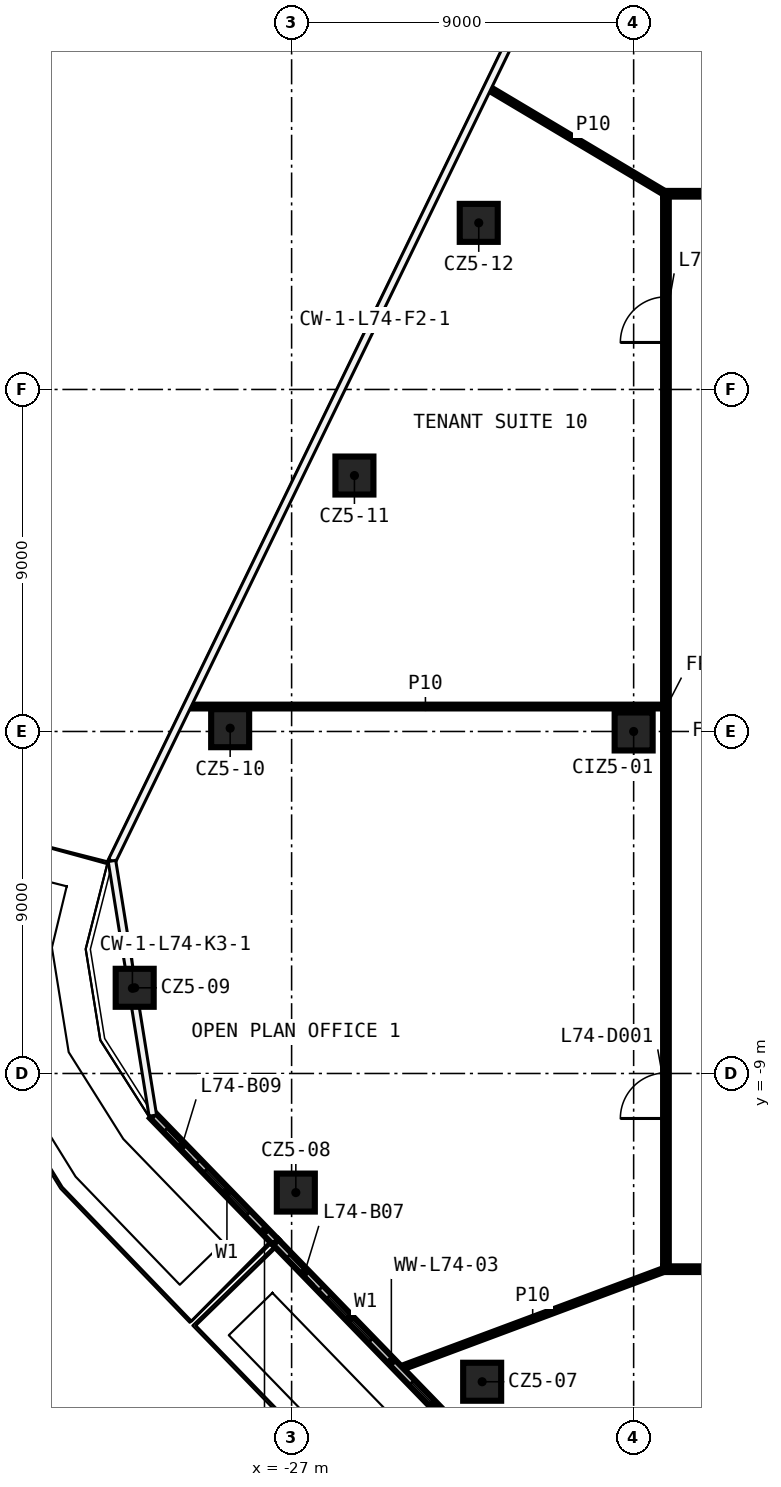
"""IFC4 building model, lengths in metres.
Left out: names, types, materials, properties, quantities, classifications, styles, units other than length and angle.
Written with IfcOpenShell. Run it as: python <this file> out.ifc"""

import sys

from ifc_helpers import new_model, si_unit, direction, frame, frame_2d, origin, origin_2d, place, context, subcontext, project, spatial, rectangle, extrude, element, fill, save


model = new_model("IFC4")
c1 = context("Model", 3, precision=1e-05, world=origin(), true_north=direction((0.0, 1.0)))
c2 = subcontext(c1, "Body", "Model", "MODEL_VIEW")
j1 = project(units=[si_unit("LENGTHUNIT", "METRE"), si_unit("PLANEANGLEUNIT", "RADIAN")], contexts=[c1])
p1 = place(None, origin())
s1 = spatial("IfcSite", under=j1, at=p1, CompositionType="ELEMENT")
p2 = place(p1, origin())
s2 = spatial("IfcBuilding", under=s1, at=p2, CompositionType="ELEMENT")
p3 = place(p2, frame((0.0, 0.0, 344.6)))
s3 = spatial("IfcBuildingStorey", under=s2, at=p3, CompositionType="ELEMENT", Elevation=344.6)
for number, where, z_axis, x_axis in (
    (1, (-21.986, -17.112, 0.0), (0.0, 0.0, 1.0), (1.0, 0.0, 0.0)),
    (2, (-26.889, -12.134, 0.0), (0.0, 0.0, 1.0), (1.0, 0.0, 0.0)),
    (3, (-31.129, -6.745, 0.0), (0.0, 0.0, 1.0), (1.0, 0.0, 0.0)),
    (4, (-28.617, 0.086, 0.0), (0.0, 0.0, 1.0), (1.0, 0.0, 0.0)),
    (5, (-25.347, 6.735, 0.0), (0.0, 0.0, 1.0), (1.0, 0.0, 0.0)),
    (6, (-22.076, 13.384, 0.0), (0.0, 0.0, 1.0), (1.0, 0.0, 0.0)),
    (7, (-18.0, 0.0, 0.0), (0.0, 0.0, 1.0), (1.0, 0.0, 0.0)),
):
    element("IfcColumn", number, at=place(p3, frame(where, z_axis=z_axis, x_axis=x_axis)), inside=s3, PredefinedType="COLUMN", context=c2, shape_type="SweptSolid", body=[
        extrude(rectangle(XDim=1.0, YDim=1.0, at=origin_2d()), origin(), (0.0, 0.0, 1.0), 3.82),
    ])
p4 = place(p3, frame((17.225, -14.15, 0.0), z_axis=(0.0, 0.0, 1.0), x_axis=(-1.0, 0.0, 0.0)))
e8 = element("IfcWall", 8, at=p4, inside=s3, PredefinedType="PARTITIONING", context=c2, shape_type="SweptSolid", body=[
    extrude(rectangle(XDim=34.45, YDim=0.15, at=frame_2d((17.225, 0.0))), origin(), (0.0, 0.0, 1.0), 3.82),
])
p5 = place(p4, frame((31.464, 0.0, 0.0)))
e9 = element("IfcOpeningElement", 9, at=p5, cuts=e8, PredefinedType="OPENING", context=c2, shape_type="SweptSolid", body=[
    extrude(rectangle(XDim=1.2, YDim=2.1, at=frame_2d((0.6, 1.05))), frame((0.0, 0.085, 0.0), z_axis=(0.0, -1.0, 0.0), x_axis=(1.0, 0.0, 0.0)), (0.0, 0.0, 1.0), 0.17),
])
p6 = place(p4, frame((24.546, 0.0, 0.0)))
e10 = element("IfcOpeningElement", 10, at=p6, cuts=e8, PredefinedType="OPENING", context=c2, shape_type="SweptSolid", body=[
    extrude(rectangle(XDim=1.2, YDim=2.1, at=frame_2d((0.6, 1.05))), frame((0.0, 0.085, 0.0), z_axis=(0.0, -1.0, 0.0), x_axis=(1.0, 0.0, 0.0)), (0.0, 0.0, 1.0), 0.17),
])
p7 = place(p4, frame((19.962, 0.0, 0.0)))
e11 = element("IfcOpeningElement", 11, at=p7, cuts=e8, PredefinedType="OPENING", context=c2, shape_type="SweptSolid", body=[
    extrude(rectangle(XDim=1.2, YDim=2.1, at=frame_2d((0.6, 1.05))), frame((0.0, 0.085, 0.0), z_axis=(0.0, -1.0, 0.0), x_axis=(1.0, 0.0, 0.0)), (0.0, 0.0, 1.0), 0.17),
])
p8 = place(p4, frame((15.375, 0.0, 0.0)))
e12 = element("IfcOpeningElement", 12, at=p8, cuts=e8, PredefinedType="OPENING", context=c2, shape_type="SweptSolid", body=[
    extrude(rectangle(XDim=1.2, YDim=2.1, at=frame_2d((0.6, 1.05))), frame((0.0, 0.085, 0.0), z_axis=(0.0, -1.0, 0.0), x_axis=(1.0, 0.0, 0.0)), (0.0, 0.0, 1.0), 0.17),
])
p9 = place(p4, frame((10.788, 0.0, 0.0)))
e13 = element("IfcOpeningElement", 13, at=p9, cuts=e8, PredefinedType="OPENING", context=c2, shape_type="SweptSolid", body=[
    extrude(rectangle(XDim=1.2, YDim=2.1, at=frame_2d((0.6, 1.05))), frame((0.0, 0.085, 0.0), z_axis=(0.0, -1.0, 0.0), x_axis=(1.0, 0.0, 0.0)), (0.0, 0.0, 1.0), 0.17),
])
p10 = place(p4, frame((6.202, 0.0, 0.0)))
e14 = element("IfcOpeningElement", 14, at=p10, cuts=e8, PredefinedType="OPENING", context=c2, shape_type="SweptSolid", body=[
    extrude(rectangle(XDim=1.2, YDim=2.1, at=frame_2d((0.6, 1.05))), frame((0.0, 0.085, 0.0), z_axis=(0.0, -1.0, 0.0), x_axis=(1.0, 0.0, 0.0)), (0.0, 0.0, 1.0), 0.17),
])
p11 = place(p4, frame((1.897, 0.0, 0.0)))
e15 = element("IfcOpeningElement", 15, at=p11, cuts=e8, PredefinedType="OPENING", context=c2, shape_type="SweptSolid", body=[
    extrude(rectangle(XDim=1.2, YDim=2.1, at=frame_2d((0.6, 1.05))), frame((0.0, 0.085, 0.0), z_axis=(0.0, -1.0, 0.0), x_axis=(1.0, 0.0, 0.0)), (0.0, 0.0, 1.0), 0.17),
])
p12 = place(p3, frame((-29.732, 0.656, 0.0), z_axis=(0.0, 0.0, 1.0), x_axis=(1.0, 0.0, 0.0)))
e16 = element("IfcWall", 16, at=p12, inside=s3, PredefinedType="PARTITIONING", context=c2, shape_type="SweptSolid", body=[
    extrude(rectangle(XDim=12.507, YDim=0.1, at=frame_2d((6.253, 0.0))), origin(), (0.0, 0.0, 1.0), 3.82),
])
p13 = place(p3, frame((-17.225, 14.15, 0.0), z_axis=(0.0, 0.0, 1.0), x_axis=(1.0, 0.0, 0.0)))
e17 = element("IfcWall", 17, at=p13, inside=s3, PredefinedType="PARTITIONING", context=c2, shape_type="SweptSolid", body=[
    extrude(rectangle(XDim=34.45, YDim=0.15, at=frame_2d((17.225, 0.0))), origin(), (0.0, 0.0, 1.0), 3.82),
])
p14 = place(p13, frame((31.19, 0.0, 0.0)))
e18 = element("IfcOpeningElement", 18, at=p14, cuts=e17, PredefinedType="OPENING", context=c2, shape_type="SweptSolid", body=[
    extrude(rectangle(XDim=1.2, YDim=2.1, at=frame_2d((0.6, 1.05))), frame((0.0, 0.085, 0.0), z_axis=(0.0, -1.0, 0.0), x_axis=(1.0, 0.0, 0.0)), (0.0, 0.0, 1.0), 0.17),
])
p15 = place(p13, frame((24.621, 0.0, 0.0)))
e19 = element("IfcOpeningElement", 19, at=p15, cuts=e17, PredefinedType="OPENING", context=c2, shape_type="SweptSolid", body=[
    extrude(rectangle(XDim=1.2, YDim=2.1, at=frame_2d((0.6, 1.05))), frame((0.0, 0.085, 0.0), z_axis=(0.0, -1.0, 0.0), x_axis=(1.0, 0.0, 0.0)), (0.0, 0.0, 1.0), 0.17),
])
p16 = place(p13, frame((17.703, 0.0, 0.0)))
e20 = element("IfcOpeningElement", 20, at=p16, cuts=e17, PredefinedType="OPENING", context=c2, shape_type="SweptSolid", body=[
    extrude(rectangle(XDim=1.2, YDim=2.1, at=frame_2d((0.6, 1.05))), frame((0.0, 0.085, 0.0), z_axis=(0.0, -1.0, 0.0), x_axis=(1.0, 0.0, 0.0)), (0.0, 0.0, 1.0), 0.17),
])
p17 = place(p13, frame((10.781, 0.0, 0.0)))
e21 = element("IfcOpeningElement", 21, at=p17, cuts=e17, PredefinedType="OPENING", context=c2, shape_type="SweptSolid", body=[
    extrude(rectangle(XDim=1.2, YDim=2.1, at=frame_2d((0.6, 1.05))), frame((0.0, 0.085, 0.0), z_axis=(0.0, -1.0, 0.0), x_axis=(1.0, 0.0, 0.0)), (0.0, 0.0, 1.0), 0.17),
])
p18 = place(p13, frame((6.171, 0.0, 0.0)))
e22 = element("IfcOpeningElement", 22, at=p18, cuts=e17, PredefinedType="OPENING", context=c2, shape_type="SweptSolid", body=[
    extrude(rectangle(XDim=1.2, YDim=2.1, at=frame_2d((0.6, 1.05))), frame((0.0, 0.085, 0.0), z_axis=(0.0, -1.0, 0.0), x_axis=(1.0, 0.0, 0.0)), (0.0, 0.0, 1.0), 0.17),
])
p19 = place(p13, frame((1.932, 0.0, 0.0)))
e23 = element("IfcOpeningElement", 23, at=p19, cuts=e17, PredefinedType="OPENING", context=c2, shape_type="SweptSolid", body=[
    extrude(rectangle(XDim=1.2, YDim=2.1, at=frame_2d((0.6, 1.05))), frame((0.0, 0.085, 0.0), z_axis=(0.0, -1.0, 0.0), x_axis=(1.0, 0.0, 0.0)), (0.0, 0.0, 1.0), 0.17),
])
p20 = place(p3, frame((-24.164, -16.767, 0.0), z_axis=(0.0, 0.0, 1.0), x_axis=(0.936910882714, 0.349568302127, 0.0)))
e24 = element("IfcWall", 24, at=p20, inside=s3, PredefinedType="PARTITIONING", context=c2, shape_type="SweptSolid", body=[
    extrude(rectangle(XDim=7.486, YDim=0.1, at=frame_2d((3.743, 0.0))), origin(), (0.0, 0.0, 1.0), 3.82),
])
p21 = place(p3, frame((-17.15, -14.075, 0.0), z_axis=(0.0, 0.0, 1.0), x_axis=(0.0, 1.0, 0.0)))
e25 = element("IfcWall", 25, at=p21, inside=s3, PredefinedType="PARTITIONING", context=c2, shape_type="SweptSolid", body=[
    extrude(rectangle(XDim=28.15, YDim=0.15, at=frame_2d((14.075, 0.0))), origin(), (0.0, 0.0, 1.0), 3.82),
])
p22 = place(p21, frame((3.891, 0.0, 0.0)))
e26 = element("IfcOpeningElement", 26, at=p22, cuts=e25, PredefinedType="OPENING", context=c2, shape_type="SweptSolid", body=[
    extrude(rectangle(XDim=1.2, YDim=2.1, at=frame_2d((0.6, 1.05))), frame((0.0, 0.085, 0.0), z_axis=(0.0, -1.0, 0.0), x_axis=(1.0, 0.0, 0.0)), (0.0, 0.0, 1.0), 0.17),
])
p23 = place(p21, frame((24.312, 0.0, 0.0)))
e27 = element("IfcOpeningElement", 27, at=p23, cuts=e25, PredefinedType="OPENING", context=c2, shape_type="SweptSolid", body=[
    extrude(rectangle(XDim=1.2, YDim=2.1, at=frame_2d((0.6, 1.05))), frame((0.0, 0.085, 0.0), z_axis=(0.0, -1.0, 0.0), x_axis=(1.0, 0.0, 0.0)), (0.0, 0.0, 1.0), 0.17),
])
p24 = place(p3, frame((-21.828, 16.935, 0.0), z_axis=(0.0, 0.0, 1.0), x_axis=(0.859229054867, -0.51159107818, 0.0)))
e28 = element("IfcWall", 28, at=p24, inside=s3, PredefinedType="PARTITIONING", context=c2, shape_type="SweptSolid", body=[
    extrude(rectangle(XDim=5.444, YDim=0.1, at=frame_2d((2.722, 0.0))), origin(), (0.0, 0.0, 1.0), 3.82),
])
p25 = place(p3, frame((-27.422, -13.438, 0.0), z_axis=(0.0, 0.0, 1.0), x_axis=(0.696377931732, -0.717675258175, 0.0)))
e29 = element("IfcWall", 29, at=p25, inside=s3, PredefinedType="SOLIDWALL", context=c2, shape_type="SweptSolid", body=[
    extrude(rectangle(XDim=9.297, YDim=0.2, at=frame_2d((4.648, 0.0))), origin(), (0.0, 0.0, 1.0), 3.7),
])
p26 = place(p25, frame((2.0, 0.0, 0.6)))
e30 = element("IfcOpeningElement", 30, at=p26, cuts=e29, PredefinedType="OPENING", context=c2, shape_type="SweptSolid", body=[
    extrude(rectangle(XDim=1.6, YDim=2.4, at=frame_2d((0.8, 1.2))), frame((0.0, 0.11, 0.0), z_axis=(0.0, -1.0, 0.0), x_axis=(1.0, 0.0, 0.0)), (0.0, 0.0, 1.0), 0.22),
])
p27 = place(p25, frame((0.5, 0.0, 0.0)))
e31 = element("IfcOpeningElement", 31, at=p27, cuts=e29, PredefinedType="OPENING", context=c2, shape_type="SweptSolid", body=[
    extrude(rectangle(XDim=1.2, YDim=2.4, at=frame_2d((0.6, 1.2))), frame((0.0, 0.11, 0.0), z_axis=(0.0, -1.0, 0.0), x_axis=(1.0, 0.0, 0.0)), (0.0, 0.0, 1.0), 0.22),
])
p28 = place(p25, frame((5.148, 0.0, 0.6)))
e32 = element("IfcOpeningElement", 32, at=p28, cuts=e29, PredefinedType="OPENING", context=c2, shape_type="SweptSolid", body=[
    extrude(rectangle(XDim=1.6, YDim=2.4, at=frame_2d((0.8, 1.2))), frame((0.0, 0.11, 0.0), z_axis=(0.0, -1.0, 0.0), x_axis=(1.0, 0.0, 0.0)), (0.0, 0.0, 1.0), 0.22),
])
p29 = place(p25, frame((7.249, 0.0, 0.0)))
e33 = element("IfcOpeningElement", 33, at=p29, cuts=e29, PredefinedType="OPENING", context=c2, shape_type="SweptSolid", body=[
    extrude(rectangle(XDim=1.2, YDim=2.4, at=frame_2d((0.6, 1.2))), frame((0.0, 0.11, 0.0), z_axis=(0.0, -1.0, 0.0), x_axis=(1.0, 0.0, 0.0)), (0.0, 0.0, 1.0), 0.22),
])
p30 = place(p3, frame((-30.652, -10.109, 0.0), z_axis=(0.0, 0.0, 1.0), x_axis=(0.696367753757, -0.717685133974, 0.0)))
e34 = element("IfcWall", 34, at=p30, inside=s3, PredefinedType="SOLIDWALL", context=c2, shape_type="SweptSolid", body=[
    extrude(rectangle(XDim=4.638, YDim=0.2, at=frame_2d((2.319, 0.0))), origin(), (0.0, 0.0, 1.0), 3.7),
])
p31 = place(p30, frame((2.0, 0.0, 0.6)))
e35 = element("IfcOpeningElement", 35, at=p31, cuts=e34, PredefinedType="OPENING", context=c2, shape_type="SweptSolid", body=[
    extrude(rectangle(XDim=1.6, YDim=2.4, at=frame_2d((0.8, 1.2))), frame((0.0, 0.11, 0.0), z_axis=(0.0, -1.0, 0.0), x_axis=(1.0, 0.0, 0.0)), (0.0, 0.0, 1.0), 0.22),
])
p32 = place(p30, frame((0.5, 0.0, 0.0)))
e36 = element("IfcOpeningElement", 36, at=p32, cuts=e34, PredefinedType="OPENING", context=c2, shape_type="SweptSolid", body=[
    extrude(rectangle(XDim=1.2, YDim=2.4, at=frame_2d((0.6, 1.2))), frame((0.0, 0.11, 0.0), z_axis=(0.0, -1.0, 0.0), x_axis=(1.0, 0.0, 0.0)), (0.0, 0.0, 1.0), 0.22),
])
p33 = place(p22, origin())
e37 = element("IfcDoor", 37, at=p33, inside=s3, OperationType="SINGLE_SWING_RIGHT", PredefinedType="DOOR", context=c2, shape_type="SweptSolid", body=[
    extrude(rectangle(XDim=1.2, YDim=2.1, at=frame_2d((0.6, 1.05))), frame((0.0, 0.025, 0.0), z_axis=(0.0, -1.0, 0.0), x_axis=(1.0, 0.0, 0.0)), (0.0, 0.0, 1.0), 0.05),
])
fill(e26, e37)
p34 = place(p23, origin())
e38 = element("IfcDoor", 38, at=p34, inside=s3, OperationType="SINGLE_SWING_LEFT", PredefinedType="DOOR", context=c2, shape_type="SweptSolid", body=[
    extrude(rectangle(XDim=1.2, YDim=2.1, at=frame_2d((0.6, 1.05))), frame((0.0, 0.025, 0.0), z_axis=(0.0, -1.0, 0.0), x_axis=(1.0, 0.0, 0.0)), (0.0, 0.0, 1.0), 0.05),
])
fill(e27, e38)
p35 = place(p26, origin())
e39 = element("IfcWindow", 39, at=p35, inside=s3, PartitioningType="SINGLE_PANEL", PredefinedType="WINDOW", context=c2, shape_type="SweptSolid", body=[
    extrude(rectangle(XDim=1.6, YDim=2.4, at=frame_2d((0.8, 1.2))), frame((0.0, 0.03, 0.0), z_axis=(0.0, -1.0, 0.0), x_axis=(1.0, 0.0, 0.0)), (0.0, 0.0, 1.0), 0.06),
])
fill(e30, e39)
p36 = place(p27, origin())
e40 = element("IfcDoor", 40, at=p36, inside=s3, OperationType="SLIDING_TO_LEFT", PredefinedType="DOOR", context=c2, shape_type="SweptSolid", body=[
    extrude(rectangle(XDim=1.2, YDim=2.4, at=frame_2d((0.6, 1.2))), frame((0.0, 0.025, 0.0), z_axis=(0.0, -1.0, 0.0), x_axis=(1.0, 0.0, 0.0)), (0.0, 0.0, 1.0), 0.05),
])
fill(e31, e40)
p37 = place(p28, origin())
e41 = element("IfcWindow", 41, at=p37, inside=s3, PartitioningType="SINGLE_PANEL", PredefinedType="WINDOW", context=c2, shape_type="SweptSolid", body=[
    extrude(rectangle(XDim=1.6, YDim=2.4, at=frame_2d((0.8, 1.2))), frame((0.0, 0.03, 0.0), z_axis=(0.0, -1.0, 0.0), x_axis=(1.0, 0.0, 0.0)), (0.0, 0.0, 1.0), 0.06),
])
fill(e32, e41)
p38 = place(p31, origin())
e42 = element("IfcWindow", 42, at=p38, inside=s3, PartitioningType="SINGLE_PANEL", PredefinedType="WINDOW", context=c2, shape_type="SweptSolid", body=[
    extrude(rectangle(XDim=1.6, YDim=2.4, at=frame_2d((0.8, 1.2))), frame((0.0, 0.03, 0.0), z_axis=(0.0, -1.0, 0.0), x_axis=(1.0, 0.0, 0.0)), (0.0, 0.0, 1.0), 0.06),
])
fill(e35, e42)
p39 = place(p32, origin())
e43 = element("IfcDoor", 43, at=p39, inside=s3, OperationType="SLIDING_TO_LEFT", PredefinedType="DOOR", context=c2, shape_type="SweptSolid", body=[
    extrude(rectangle(XDim=1.2, YDim=2.4, at=frame_2d((0.6, 1.2))), frame((0.0, 0.025, 0.0), z_axis=(0.0, -1.0, 0.0), x_axis=(1.0, 0.0, 0.0)), (0.0, 0.0, 1.0), 0.05),
])
fill(e36, e43)
save(model, sys.argv[1])
